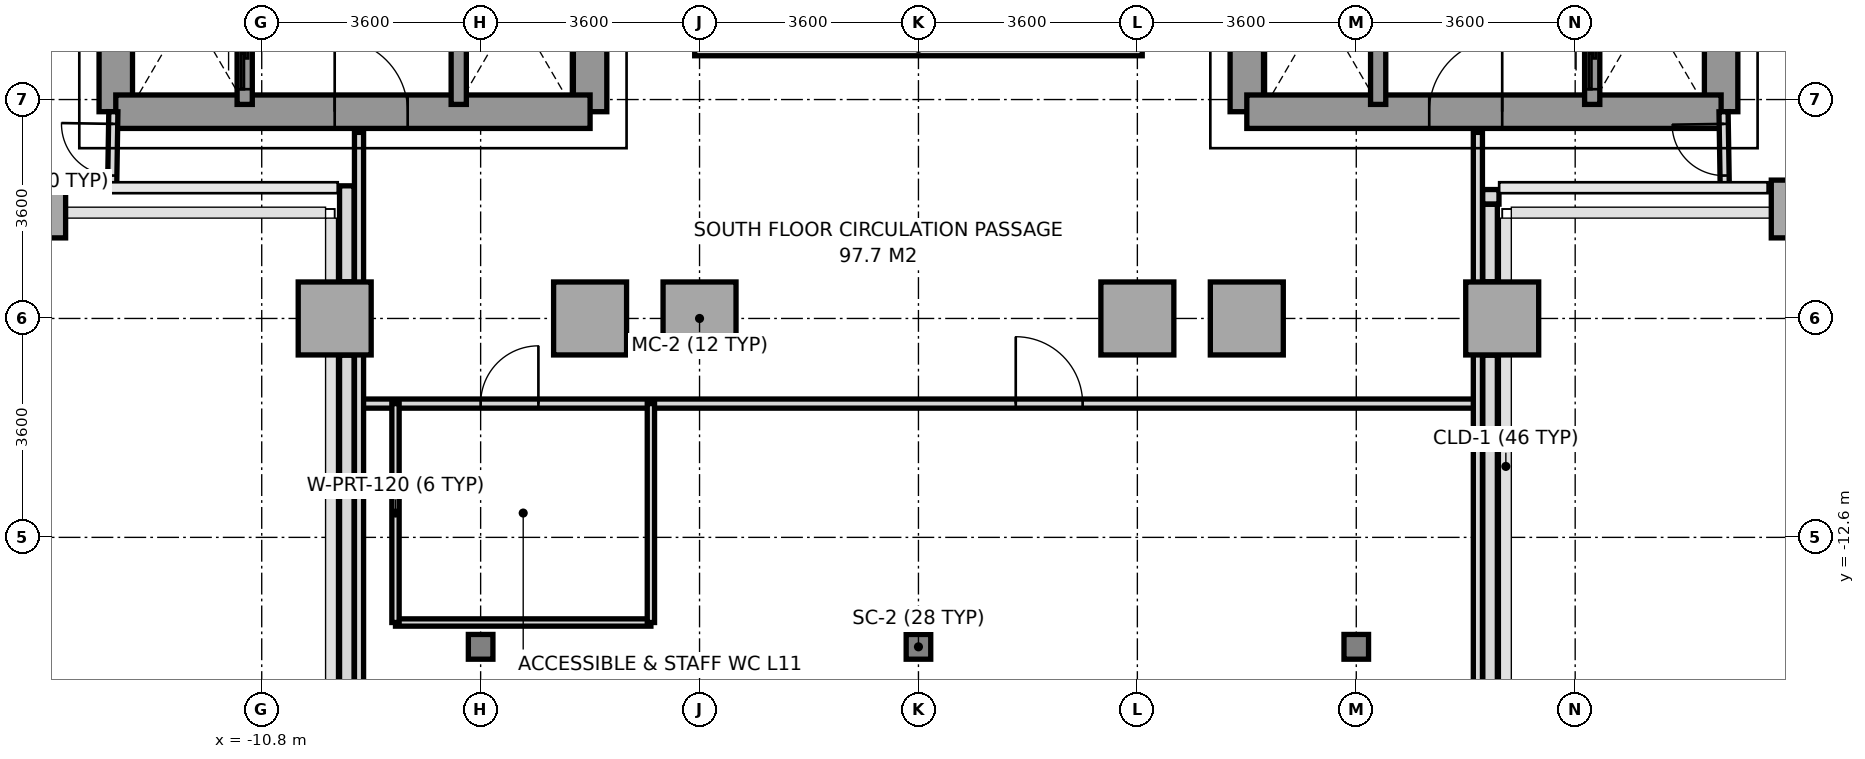
"""IFC4 building model, lengths in metres.
Left out: names, types, materials, properties, quantities, classifications, styles, units other than length and angle.
Written with IfcOpenShell. Run it as: python <this file> out.ifc"""

import sys

from ifc_helpers import new_model, si_unit, direction, frame, frame_2d, origin, origin_2d, place, context, subcontext, project, spatial, rectangle, i_section, extrude, source, transform, mapped, element, fill, save


model = new_model("IFC4")
c1 = context("Model", 3, precision=1e-05, world=origin(), true_north=direction((0.0, 1.0)))
c2 = subcontext(c1, "Body", "Model", "MODEL_VIEW")
j1 = project(units=[si_unit("LENGTHUNIT", "METRE"), si_unit("PLANEANGLEUNIT", "RADIAN")], contexts=[c1])
p1 = place(None, origin())
s1 = spatial("IfcSite", under=j1, at=p1, CompositionType="ELEMENT")
p2 = place(p1, origin())
s2 = spatial("IfcBuilding", under=s1, at=p2, CompositionType="ELEMENT")
p3 = place(p2, frame((0.0, 0.0, 47.6)))
s3 = spatial("IfcBuildingStorey", under=s2, at=p3, CompositionType="ELEMENT", Elevation=47.6)
m1 = source(origin(), c2, "Body", "SweptSolid", [
    extrude(rectangle(XDim=0.75, YDim=0.95, at=origin_2d()), origin(), (0.0, 0.0, 1.0), 3.2),
])
p4 = place(p3, frame((-14.4, -7.2, 0.0), z_axis=(0.0, 0.0, 1.0), x_axis=(1.0, 0.0, 0.0)))
e1 = element("IfcColumn", 1, at=p4, inside=s3, PredefinedType="COLUMN", context=c2, shape_type="MappedRepresentation", body=[
    mapped(m1, transform((0.0, 0.0, 0.0), x_axis=(1.0, 0.0, 0.0), y_axis=(0.0, 1.0, 0.0), z_axis=(0.0, 0.0, 1.0), scale=1.0)),
])
m2 = source(origin(), c2, "Body", "SweptSolid", [
    extrude(rectangle(XDim=1.2, YDim=1.2, at=origin_2d()), origin(), (0.0, 0.0, 1.0), 3.2),
])
p5 = place(p3, frame((-9.6, -9.0, 0.0), z_axis=(0.0, 0.0, 1.0), x_axis=(1.0, 0.0, 0.0)))
e2 = element("IfcColumn", 2, at=p5, inside=s3, PredefinedType="COLUMN", context=c2, shape_type="MappedRepresentation", body=[
    mapped(m2, transform((0.0, 0.0, 0.0), x_axis=(1.0, 0.0, 0.0), y_axis=(0.0, 1.0, 0.0), z_axis=(0.0, 0.0, 1.0), scale=1.0)),
])
m3 = source(origin(), c2, "Body", "SweptSolid", [
    extrude(i_section(OverallWidth=0.404, OverallDepth=0.407, WebThickness=0.022, FlangeThickness=0.035, at=origin_2d()), origin(), (0.0, 0.0, 1.0), 3.2),
])
p6 = place(p3, frame((-7.2, -14.4, 0.0), z_axis=(0.0, 0.0, 1.0), x_axis=(1.0, 0.0, 0.0)))
e3 = element("IfcColumn", 3, at=p6, inside=s3, PredefinedType="COLUMN", context=c2, shape_type="MappedRepresentation", body=[
    mapped(m3, transform((0.0, 0.0, 0.0), x_axis=(1.0, 0.0, 0.0), y_axis=(0.0, 1.0, 0.0), z_axis=(0.0, 0.0, 1.0), scale=1.0)),
])
for number, where, z_axis, x_axis in (
    (4, (-5.4, -9.0, 0.0), (0.0, 0.0, 1.0), (1.0, 0.0, 0.0)),
    (5, (-3.6, -9.0, 0.0), (0.0, 0.0, 1.0), (1.0, 0.0, 0.0)),
):
    element("IfcColumn", number, at=place(p3, frame(where, z_axis=z_axis, x_axis=x_axis)), inside=s3, PredefinedType="COLUMN", context=c2, shape_type="MappedRepresentation", body=[
        mapped(m2, transform((0.0, 0.0, 0.0), x_axis=(1.0, 0.0, 0.0), y_axis=(0.0, 1.0, 0.0), z_axis=(0.0, 0.0, 1.0), scale=1.0)),
    ])
p7 = place(p3, frame((0.0, -14.4, 0.0), z_axis=(0.0, 0.0, 1.0), x_axis=(1.0, 0.0, 0.0)))
e6 = element("IfcColumn", 6, at=p7, inside=s3, PredefinedType="COLUMN", context=c2, shape_type="MappedRepresentation", body=[
    mapped(m3, transform((0.0, 0.0, 0.0), x_axis=(1.0, 0.0, 0.0), y_axis=(0.0, 1.0, 0.0), z_axis=(0.0, 0.0, 1.0), scale=1.0)),
])
for number, where, z_axis, x_axis in (
    (7, (3.6, -9.0, 0.0), (0.0, 0.0, 1.0), (1.0, 0.0, 0.0)),
    (8, (5.4, -9.0, 0.0), (0.0, 0.0, 1.0), (1.0, 0.0, 0.0)),
):
    element("IfcColumn", number, at=place(p3, frame(where, z_axis=z_axis, x_axis=x_axis)), inside=s3, PredefinedType="COLUMN", context=c2, shape_type="MappedRepresentation", body=[
        mapped(m2, transform((0.0, 0.0, 0.0), x_axis=(1.0, 0.0, 0.0), y_axis=(0.0, 1.0, 0.0), z_axis=(0.0, 0.0, 1.0), scale=1.0)),
    ])
p8 = place(p3, frame((7.2, -14.4, 0.0), z_axis=(0.0, 0.0, 1.0), x_axis=(1.0, 0.0, 0.0)))
e9 = element("IfcColumn", 9, at=p8, inside=s3, PredefinedType="COLUMN", context=c2, shape_type="MappedRepresentation", body=[
    mapped(m3, transform((0.0, 0.0, 0.0), x_axis=(1.0, 0.0, 0.0), y_axis=(0.0, 1.0, 0.0), z_axis=(0.0, 0.0, 1.0), scale=1.0)),
])
p9 = place(p3, frame((9.6, -9.0, 0.0), z_axis=(0.0, 0.0, 1.0), x_axis=(1.0, 0.0, 0.0)))
e10 = element("IfcColumn", 10, at=p9, inside=s3, PredefinedType="COLUMN", context=c2, shape_type="MappedRepresentation", body=[
    mapped(m2, transform((0.0, 0.0, 0.0), x_axis=(1.0, 0.0, 0.0), y_axis=(0.0, 1.0, 0.0), z_axis=(0.0, 0.0, 1.0), scale=1.0)),
])
p10 = place(p3, frame((14.4, -7.2, 0.0), z_axis=(0.0, 0.0, 1.0), x_axis=(1.0, 0.0, 0.0)))
e11 = element("IfcColumn", 11, at=p10, inside=s3, PredefinedType="COLUMN", context=c2, shape_type="MappedRepresentation", body=[
    mapped(m1, transform((0.0, 0.0, 0.0), x_axis=(1.0, 0.0, 0.0), y_axis=(0.0, 1.0, 0.0), z_axis=(0.0, 0.0, 1.0), scale=1.0)),
])
p11 = place(p3, frame((9.547, -7.0, 0.0), z_axis=(0.0, 0.0, 1.0), x_axis=(-1.0, 0.0, 0.0)))
e12 = element("IfcWall", 12, at=p11, inside=s3, PredefinedType="PARAPET", context=c2, shape_type="SweptSolid", body=[
    extrude(rectangle(XDim=0.269, YDim=0.24, at=frame_2d((0.135, 0.0))), origin(), (0.0, 0.0, 1.0), 1.15),
])
p12 = place(p3, frame((9.4, -7.123, 0.0), z_axis=(0.0, 0.0, 1.0), x_axis=(0.0, -1.0, 0.0)))
e13 = element("IfcWall", 13, at=p12, inside=s3, PredefinedType="PARAPET", context=c2, shape_type="SweptSolid", body=[
    extrude(rectangle(XDim=1.274, YDim=0.24, at=frame_2d((0.637, 0.0))), origin(), (0.0, 0.0, 1.0), 1.15),
])
p13 = place(p3, frame((9.4, -9.603, 0.0), z_axis=(0.0, 0.0, 1.0), x_axis=(0.0, -1.0, 0.0)))
e14 = element("IfcWall", 14, at=p13, inside=s3, PredefinedType="PARAPET", context=c2, shape_type="SweptSolid", body=[
    extrude(rectangle(XDim=6.0, YDim=0.24, at=frame_2d((3.0, 0.0))), origin(), (0.0, 0.0, 1.0), 1.15),
])
p14 = place(p3, frame((-9.4, -15.358, 0.0), z_axis=(0.0, 0.0, 1.0), x_axis=(0.0, 1.0, 0.0)))
e15 = element("IfcWall", 15, at=p14, inside=s3, PredefinedType="PARAPET", context=c2, shape_type="SweptSolid", body=[
    extrude(rectangle(XDim=5.755, YDim=0.24, at=frame_2d((2.877, 0.0))), origin(), (0.0, 0.0, 1.0), 1.15),
])
p15 = place(p3, frame((-9.4, -8.397, 0.0), z_axis=(0.0, 0.0, 1.0), x_axis=(0.0, 1.0, 0.0)))
e16 = element("IfcWall", 16, at=p15, inside=s3, PredefinedType="PARAPET", context=c2, shape_type="SweptSolid", body=[
    extrude(rectangle(XDim=1.578, YDim=0.24, at=frame_2d((0.789, 0.0))), origin(), (0.0, 0.0, 1.0), 1.15),
])
p16 = place(p3, frame((-13.2, -5.6, 0.0), z_axis=(0.0, 0.0, 1.0), x_axis=(0.0, 1.0, 0.0)))
e17 = element("IfcWall", 17, at=p16, inside=s3, PredefinedType="SHEAR", context=c2, shape_type="SweptSolid", body=[
    extrude(rectangle(XDim=11.2, YDim=0.55, at=frame_2d((5.6, 0.0))), origin(), (0.0, 0.0, 1.0), 3.2),
])
p17 = place(p3, frame((-5.4, -5.6, 0.0), z_axis=(0.0, 0.0, 1.0), x_axis=(0.0, 1.0, 0.0)))
e18 = element("IfcWall", 18, at=p17, inside=s3, PredefinedType="SHEAR", context=c2, shape_type="SweptSolid", body=[
    extrude(rectangle(XDim=12.5, YDim=0.55, at=frame_2d((6.25, 0.0))), origin(), (0.0, 0.0, 1.0), 3.2),
])
p18 = place(p17, frame((4.55, 0.0, 0.0)))
e19 = element("IfcOpeningElement", 19, at=p18, cuts=e18, PredefinedType="OPENING", context=c2, shape_type="SweptSolid", body=[
    extrude(rectangle(XDim=1.2, YDim=2.2, at=frame_2d((0.6, 1.1))), frame((0.0, 0.285, 0.0), z_axis=(0.0, -1.0, 0.0), x_axis=(1.0, 0.0, 0.0)), (0.0, 0.0, 1.0), 0.57),
])
p19 = place(p17, frame((6.86, 0.0, 0.0)))
e20 = element("IfcOpeningElement", 20, at=p19, cuts=e18, PredefinedType="OPENING", context=c2, shape_type="SweptSolid", body=[
    extrude(rectangle(XDim=0.8, YDim=2.1, at=frame_2d((0.4, 1.05))), frame((0.0, 0.285, 0.0), z_axis=(0.0, -1.0, 0.0), x_axis=(1.0, 0.0, 0.0)), (0.0, 0.0, 1.0), 0.57),
])
p20 = place(p17, frame((7.88, 0.0, 0.0)))
e21 = element("IfcOpeningElement", 21, at=p20, cuts=e18, PredefinedType="OPENING", context=c2, shape_type="SweptSolid", body=[
    extrude(rectangle(XDim=0.8, YDim=2.1, at=frame_2d((0.4, 1.05))), frame((0.0, 0.285, 0.0), z_axis=(0.0, -1.0, 0.0), x_axis=(1.0, 0.0, 0.0)), (0.0, 0.0, 1.0), 0.57),
])
p21 = place(p3, frame((-13.2, -5.6, 0.0), z_axis=(0.0, 0.0, 1.0), x_axis=(1.0, 0.0, 0.0)))
e22 = element("IfcWall", 22, at=p21, inside=s3, PredefinedType="SHEAR", context=c2, shape_type="SweptSolid", body=[
    extrude(rectangle(XDim=7.8, YDim=0.55, at=frame_2d((3.9, 0.0))), origin(), (0.0, 0.0, 1.0), 3.2),
])
p22 = place(p21, frame((3.6, 0.0, 0.0)))
e23 = element("IfcOpeningElement", 23, at=p22, cuts=e22, PredefinedType="OPENING", context=c2, shape_type="SweptSolid", body=[
    extrude(rectangle(XDim=1.2, YDim=2.2, at=frame_2d((0.6, 1.1))), frame((0.0, 0.285, 0.0), z_axis=(0.0, -1.0, 0.0), x_axis=(1.0, 0.0, 0.0)), (0.0, 0.0, 1.0), 0.57),
])
p23 = place(p3, frame((13.2, -5.6, 0.0), z_axis=(0.0, 0.0, 1.0), x_axis=(0.0, 1.0, 0.0)))
e24 = element("IfcWall", 24, at=p23, inside=s3, PredefinedType="SHEAR", context=c2, shape_type="SweptSolid", body=[
    extrude(rectangle(XDim=11.2, YDim=0.55, at=frame_2d((5.6, 0.0))), origin(), (0.0, 0.0, 1.0), 3.2),
])
p24 = place(p3, frame((5.4, -5.6, 0.0), z_axis=(0.0, 0.0, 1.0), x_axis=(0.0, 1.0, 0.0)))
e25 = element("IfcWall", 25, at=p24, inside=s3, PredefinedType="SHEAR", context=c2, shape_type="SweptSolid", body=[
    extrude(rectangle(XDim=12.5, YDim=0.55, at=frame_2d((6.25, 0.0))), origin(), (0.0, 0.0, 1.0), 3.2),
])
p25 = place(p24, frame((4.55, 0.0, 0.0)))
e26 = element("IfcOpeningElement", 26, at=p25, cuts=e25, PredefinedType="OPENING", context=c2, shape_type="SweptSolid", body=[
    extrude(rectangle(XDim=1.2, YDim=2.2, at=frame_2d((0.6, 1.1))), frame((0.0, 0.285, 0.0), z_axis=(0.0, -1.0, 0.0), x_axis=(1.0, 0.0, 0.0)), (0.0, 0.0, 1.0), 0.57),
])
p26 = place(p3, frame((5.4, -5.6, 0.0), z_axis=(0.0, 0.0, 1.0), x_axis=(1.0, 0.0, 0.0)))
e27 = element("IfcWall", 27, at=p26, inside=s3, PredefinedType="SHEAR", context=c2, shape_type="SweptSolid", body=[
    extrude(rectangle(XDim=7.8, YDim=0.55, at=frame_2d((3.9, 0.0))), origin(), (0.0, 0.0, 1.0), 3.2),
])
p27 = place(p26, frame((3.0, 0.0, 0.0)))
e28 = element("IfcOpeningElement", 28, at=p27, cuts=e27, PredefinedType="OPENING", context=c2, shape_type="SweptSolid", body=[
    extrude(rectangle(XDim=1.2, YDim=2.2, at=frame_2d((0.6, 1.1))), frame((0.0, 0.285, 0.0), z_axis=(0.0, -1.0, 0.0), x_axis=(1.0, 0.0, 0.0)), (0.0, 0.0, 1.0), 0.57),
])
p28 = place(p3, frame((-11.08, -5.48, 0.0), z_axis=(0.0, 0.0, 1.0), x_axis=(0.0, 1.0, 0.0)))
e29 = element("IfcWall", 29, at=p28, inside=s3, PredefinedType="SOLIDWALL", context=c2, shape_type="SweptSolid", body=[
    extrude(rectangle(XDim=1.6, YDim=0.25, at=frame_2d((0.8, 0.0))), origin(), (0.0, 0.0, 1.0), 3.2),
])
p29 = place(p28, frame((0.25, 0.0, 0.0)))
e30 = element("IfcOpeningElement", 30, at=p29, cuts=e29, PredefinedType="OPENING", context=c2, shape_type="SweptSolid", body=[
    extrude(rectangle(XDim=1.1, YDim=2.2, at=frame_2d((0.55, 1.1))), frame((0.0, 0.135, 0.0), z_axis=(0.0, -1.0, 0.0), x_axis=(1.0, 0.0, 0.0)), (0.0, 0.0, 1.0), 0.27),
])
p30 = place(p3, frame((11.08, -5.48, 0.0), z_axis=(0.0, 0.0, 1.0), x_axis=(0.0, 1.0, 0.0)))
e31 = element("IfcWall", 31, at=p30, inside=s3, PredefinedType="SOLIDWALL", context=c2, shape_type="SweptSolid", body=[
    extrude(rectangle(XDim=1.6, YDim=0.25, at=frame_2d((0.8, 0.0))), origin(), (0.0, 0.0, 1.0), 3.2),
])
p31 = place(p30, frame((0.25, 0.0, 0.0)))
e32 = element("IfcOpeningElement", 32, at=p31, cuts=e31, PredefinedType="OPENING", context=c2, shape_type="SweptSolid", body=[
    extrude(rectangle(XDim=1.1, YDim=2.2, at=frame_2d((0.55, 1.1))), frame((0.0, 0.135, 0.0), z_axis=(0.0, -1.0, 0.0), x_axis=(1.0, 0.0, 0.0)), (0.0, 0.0, 1.0), 0.27),
])
for number, where, z_axis, x_axis in (
    (33, (-7.56, -5.48, 0.0), (0.0, 0.0, 1.0), (0.0, 1.0, 0.0)),
    (34, (7.56, -5.48, 0.0), (0.0, 0.0, 1.0), (0.0, 1.0, 0.0)),
):
    element("IfcWall", number, at=place(p3, frame(where, z_axis=z_axis, x_axis=x_axis)), inside=s3, PredefinedType="SOLIDWALL", context=c2, shape_type="SweptSolid", body=[
        extrude(rectangle(XDim=1.6, YDim=0.25, at=frame_2d((0.8, 0.0))), origin(), (0.0, 0.0, 1.0), 3.2),
    ])
p32 = place(p3, frame((-9.2, -10.4, 0.0), z_axis=(0.0, 0.0, 1.0), x_axis=(1.0, 0.0, 0.0)))
e35 = element("IfcWall", 35, at=p32, inside=s3, PredefinedType="PARTITIONING", context=c2, shape_type="SweptSolid", body=[
    extrude(rectangle(XDim=18.4, YDim=0.15, at=frame_2d((9.2, 0.0))), origin(), (0.0, 0.0, 1.0), 3.2),
])
p33 = place(p32, frame((2.0, 0.0, 0.0)))
e36 = element("IfcOpeningElement", 36, at=p33, cuts=e35, PredefinedType="OPENING", context=c2, shape_type="SweptSolid", body=[
    extrude(rectangle(XDim=0.95, YDim=2.15, at=frame_2d((0.475, 1.075))), frame((0.0, 0.085, 0.0), z_axis=(0.0, -1.0, 0.0), x_axis=(1.0, 0.0, 0.0)), (0.0, 0.0, 1.0), 0.17),
])
p34 = place(p32, frame((10.8, 0.0, 0.0)))
e37 = element("IfcOpeningElement", 37, at=p34, cuts=e35, PredefinedType="OPENING", context=c2, shape_type="SweptSolid", body=[
    extrude(rectangle(XDim=1.1, YDim=2.2, at=frame_2d((0.55, 1.1))), frame((0.0, 0.085, 0.0), z_axis=(0.0, -1.0, 0.0), x_axis=(1.0, 0.0, 0.0)), (0.0, 0.0, 1.0), 0.17),
])
for number, where, z_axis, x_axis in (
    (38, (-9.2, -15.68, 0.0), (0.0, 0.0, 1.0), (0.0, 1.0, 0.0)),
    (39, (9.2, -15.68, 0.0), (0.0, 0.0, 1.0), (0.0, 1.0, 0.0)),
):
    element("IfcWall", number, at=place(p3, frame(where, z_axis=z_axis, x_axis=x_axis)), inside=s3, PredefinedType="PARTITIONING", context=c2, shape_type="SweptSolid", body=[
        extrude(rectangle(XDim=9.74, YDim=0.15, at=frame_2d((4.87, 0.0))), origin(), (0.0, 0.0, 1.0), 2.71),
    ])
p35 = place(p3, frame((-8.6, -14.0, 0.0), z_axis=(0.0, 0.0, 1.0), x_axis=(1.0, 0.0, 0.0)))
e40 = element("IfcWall", 40, at=p35, inside=s3, PredefinedType="PARTITIONING", context=c2, shape_type="SweptSolid", body=[
    extrude(rectangle(XDim=4.2, YDim=0.12, at=frame_2d((2.1, 0.0))), origin(), (0.0, 0.0, 1.0), 3.2),
])
for number, where, z_axis, x_axis in (
    (41, (-8.6, -14.0, 0.0), (0.0, 0.0, 1.0), (0.0, 1.0, 0.0)),
    (42, (-4.4, -14.0, 0.0), (0.0, 0.0, 1.0), (0.0, 1.0, 0.0)),
):
    element("IfcWall", number, at=place(p3, frame(where, z_axis=z_axis, x_axis=x_axis)), inside=s3, PredefinedType="PARTITIONING", context=c2, shape_type="SweptSolid", body=[
        extrude(rectangle(XDim=3.6, YDim=0.12, at=frame_2d((1.8, 0.0))), origin(), (0.0, 0.0, 1.0), 3.2),
    ])
p36 = place(p3, frame((-13.26, -6.85, 0.0), z_axis=(0.0, 0.0, 1.0), x_axis=(0.016013571389, 0.999871774545, 0.0)))
e43 = element("IfcWall", 43, at=p36, inside=s3, PredefinedType="PARTITIONING", context=c2, shape_type="SweptSolid", body=[
    extrude(rectangle(XDim=1.25, YDim=0.15, at=frame_2d((0.625, 0.0))), origin(), (0.0, 0.0, 1.0), 3.2),
])
p37 = place(p36, frame((0.2, 0.0, 0.0)))
e44 = element("IfcOpeningElement", 44, at=p37, cuts=e43, PredefinedType="OPENING", context=c2, shape_type="SweptSolid", body=[
    extrude(rectangle(XDim=0.85, YDim=2.1, at=frame_2d((0.425, 1.05))), frame((0.0, 0.085, 0.0), z_axis=(0.0, -1.0, 0.0), x_axis=(1.0, 0.0, 0.0)), (0.0, 0.0, 1.0), 0.17),
])
p38 = place(p3, frame((13.26, -6.85, 0.0), z_axis=(0.0, 0.0, 1.0), x_axis=(-0.016013571389, 0.999871774545, 0.0)))
e45 = element("IfcWall", 45, at=p38, inside=s3, PredefinedType="PARTITIONING", context=c2, shape_type="SweptSolid", body=[
    extrude(rectangle(XDim=1.25, YDim=0.15, at=frame_2d((0.625, 0.0))), origin(), (0.0, 0.0, 1.0), 3.2),
])
p39 = place(p38, frame((0.2, 0.0, 0.0)))
e46 = element("IfcOpeningElement", 46, at=p39, cuts=e45, PredefinedType="OPENING", context=c2, shape_type="SweptSolid", body=[
    extrude(rectangle(XDim=0.85, YDim=2.1, at=frame_2d((0.425, 1.05))), frame((0.0, 0.085, 0.0), z_axis=(0.0, -1.0, 0.0), x_axis=(1.0, 0.0, 0.0)), (0.0, 0.0, 1.0), 0.17),
])
p40 = place(p3, frame((-3.68, -4.56, 0.0), z_axis=(0.0, 0.0, 1.0), x_axis=(1.0, 0.0, 0.0)))
e47 = element("IfcWall", 47, at=p40, inside=s3, PredefinedType="PARAPET", context=c2, shape_type="SweptSolid", body=[
    extrude(rectangle(XDim=7.36, YDim=0.24, at=frame_2d((3.68, 0.0))), origin(), (0.0, 0.0, 1.0), 1.15),
])
m4 = source(origin(), c2, "Body", "SweptSolid", [
    extrude(rectangle(XDim=1.2, YDim=2.2, at=frame_2d((0.6, 1.1))), frame((0.0, 0.025, 0.0), z_axis=(0.0, -1.0, 0.0), x_axis=(1.0, 0.0, 0.0)), (0.0, 0.0, 1.0), 0.05),
])
p41 = place(p22, origin())
e48 = element("IfcDoor", 48, at=p41, inside=s3, OperationType="SINGLE_SWING_LEFT", PredefinedType="DOOR", context=c2, shape_type="MappedRepresentation", body=[
    mapped(m4, transform((0.0, 0.0, 0.0), x_axis=(1.0, 0.0, 0.0), y_axis=(0.0, 1.0, 0.0), z_axis=(0.0, 0.0, 1.0), scale=1.0)),
])
fill(e23, e48)
p42 = place(p27, origin())
e49 = element("IfcDoor", 49, at=p42, inside=s3, OperationType="SINGLE_SWING_RIGHT", PredefinedType="DOOR", context=c2, shape_type="MappedRepresentation", body=[
    mapped(m4, transform((0.0, 0.0, 0.0), x_axis=(1.0, 0.0, 0.0), y_axis=(0.0, 1.0, 0.0), z_axis=(0.0, 0.0, 1.0), scale=1.0)),
])
fill(e28, e49)
m5 = source(origin(), c2, "Body", "SweptSolid", [
    extrude(rectangle(XDim=1.1, YDim=2.2, at=frame_2d((0.55, 1.1))), frame((0.0, 0.025, 0.0), z_axis=(0.0, -1.0, 0.0), x_axis=(1.0, 0.0, 0.0)), (0.0, 0.0, 1.0), 0.05),
])
p43 = place(p29, origin())
e50 = element("IfcDoor", 50, at=p43, inside=s3, OperationType="SLIDING_TO_LEFT", PredefinedType="DOOR", context=c2, shape_type="MappedRepresentation", body=[
    mapped(m5, transform((0.0, 0.0, 0.0), x_axis=(1.0, 0.0, 0.0), y_axis=(0.0, 1.0, 0.0), z_axis=(0.0, 0.0, 1.0), scale=1.0)),
])
fill(e30, e50)
p44 = place(p31, origin())
e51 = element("IfcDoor", 51, at=p44, inside=s3, OperationType="SLIDING_TO_LEFT", PredefinedType="DOOR", context=c2, shape_type="MappedRepresentation", body=[
    mapped(m5, transform((0.0, 0.0, 0.0), x_axis=(1.0, 0.0, 0.0), y_axis=(0.0, 1.0, 0.0), z_axis=(0.0, 0.0, 1.0), scale=1.0)),
])
fill(e32, e51)
m6 = source(origin(), c2, "Body", "SweptSolid", [
    extrude(rectangle(XDim=0.95, YDim=2.15, at=frame_2d((0.475, 1.075))), frame((0.0, 0.025, 0.0), z_axis=(0.0, -1.0, 0.0), x_axis=(1.0, 0.0, 0.0)), (0.0, 0.0, 1.0), 0.05),
])
p45 = place(p33, origin())
e52 = element("IfcDoor", 52, at=p45, inside=s3, OperationType="SINGLE_SWING_RIGHT", PredefinedType="DOOR", context=c2, shape_type="MappedRepresentation", body=[
    mapped(m6, transform((0.0, 0.0, 0.0), x_axis=(1.0, 0.0, 0.0), y_axis=(0.0, 1.0, 0.0), z_axis=(0.0, 0.0, 1.0), scale=1.0)),
])
fill(e36, e52)
p46 = place(p34, origin())
e53 = element("IfcDoor", 53, at=p46, inside=s3, OperationType="SINGLE_SWING_LEFT", PredefinedType="DOOR", context=c2, shape_type="MappedRepresentation", body=[
    mapped(m5, transform((0.0, 0.0, 0.0), x_axis=(1.0, 0.0, 0.0), y_axis=(0.0, 1.0, 0.0), z_axis=(0.0, 0.0, 1.0), scale=1.0)),
])
fill(e37, e53)
m7 = source(origin(), c2, "Body", "SweptSolid", [
    extrude(rectangle(XDim=0.85, YDim=2.1, at=frame_2d((0.425, 1.05))), frame((0.0, 0.025, 0.0), z_axis=(0.0, -1.0, 0.0), x_axis=(1.0, 0.0, 0.0)), (0.0, 0.0, 1.0), 0.05),
])
p47 = place(p37, origin())
e54 = element("IfcDoor", 54, at=p47, inside=s3, OperationType="SINGLE_SWING_RIGHT", PredefinedType="DOOR", context=c2, shape_type="MappedRepresentation", body=[
    mapped(m7, transform((0.0, 0.0, 0.0), x_axis=(1.0, 0.0, 0.0), y_axis=(0.0, 1.0, 0.0), z_axis=(0.0, 0.0, 1.0), scale=1.0)),
])
fill(e44, e54)
p48 = place(p39, origin())
e55 = element("IfcDoor", 55, at=p48, inside=s3, OperationType="SINGLE_SWING_RIGHT", PredefinedType="DOOR", context=c2, shape_type="MappedRepresentation", body=[
    mapped(m7, transform((0.0, 0.0, 0.0), x_axis=(1.0, 0.0, 0.0), y_axis=(0.0, 1.0, 0.0), z_axis=(0.0, 0.0, 1.0), scale=1.0)),
])
fill(e46, e55)
save(model, sys.argv[1])
